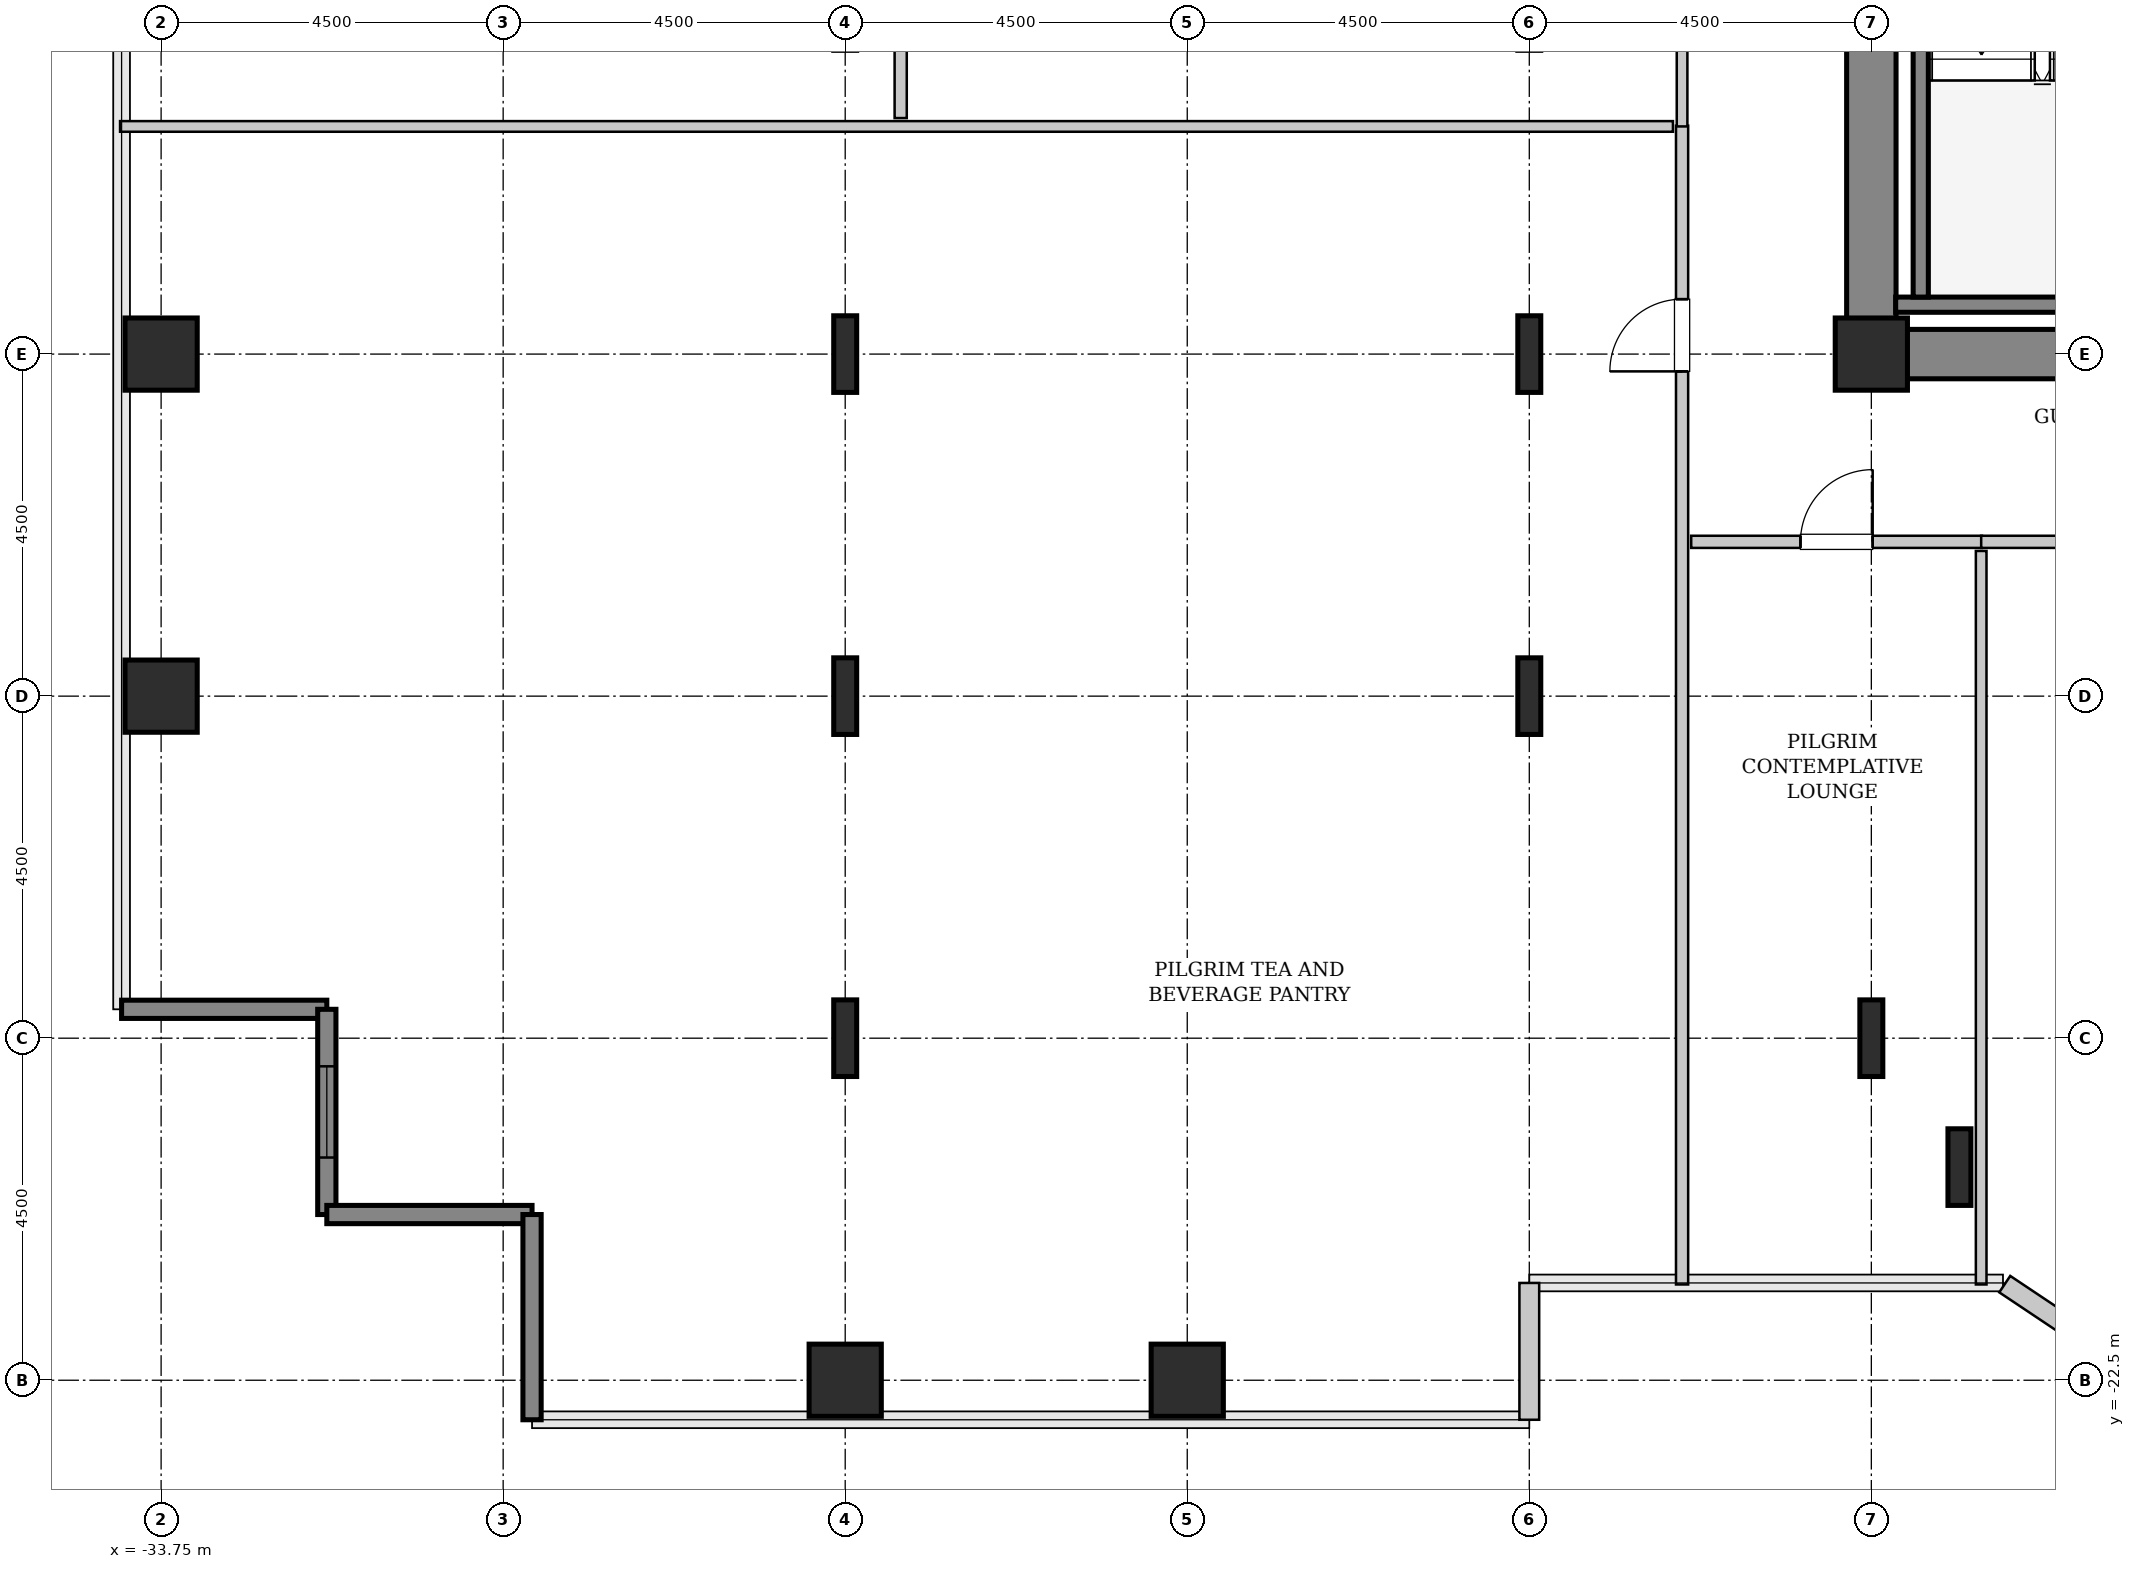
"""IFC4 building model, lengths in metres.
Left out: names, types, materials, properties, quantities, classifications, styles, units other than length and angle.
Written with IfcOpenShell. Run it as: python <this file> out.ifc"""

import sys

from ifc_helpers import new_model, si_unit, direction, frame, frame_2d, origin, origin_2d, place, context, subcontext, project, spatial, rectangle, hollow_rectangle, i_section, extrude, source, transform, mapped, element, fill, save


model = new_model("IFC4")
c1 = context("Model", 3, precision=1e-05, world=origin(), true_north=direction((0.0, 1.0)))
c2 = subcontext(c1, "Body", "Model", "MODEL_VIEW")
j1 = project(units=[si_unit("LENGTHUNIT", "METRE"), si_unit("PLANEANGLEUNIT", "RADIAN")], contexts=[c1])
p1 = place(None, origin())
s1 = spatial("IfcSite", under=j1, at=p1, CompositionType="ELEMENT")
p2 = place(p1, origin())
s2 = spatial("IfcBuilding", under=s1, at=p2, CompositionType="ELEMENT")
p3 = place(p2, frame((0.0, 0.0, 59.6)))
s3 = spatial("IfcBuildingStorey", under=s2, at=p3, CompositionType="ELEMENT", Elevation=59.6)
m1 = source(origin(), c2, "Body", "SweptSolid", [
    extrude(rectangle(XDim=10.025, YDim=0.65, at=frame_2d((5.012, 0.0))), origin(), (0.0, 0.0, 1.0), 3.8),
])
p4 = place(p3, frame((-11.575, -9.0, 0.0), z_axis=(0.0, 0.0, 1.0), x_axis=(1.0, 0.0, 0.0)))
e1 = element("IfcWall", 1, at=p4, inside=s3, PredefinedType="SHEAR", context=c2, shape_type="MappedRepresentation", body=[
    mapped(m1, transform((0.0, 0.0, 0.0), x_axis=(1.0, 0.0, 0.0), y_axis=(0.0, 1.0, 0.0), z_axis=(0.0, 0.0, 1.0), scale=1.0)),
])
m2 = source(origin(), c2, "Body", "SweptSolid", [
    extrude(rectangle(XDim=7.325, YDim=0.65, at=frame_2d((3.663, 0.0))), origin(), (0.0, 0.0, 1.0), 3.8),
])
p5 = place(p3, frame((-11.25, -8.675, 0.0), z_axis=(0.0, 0.0, 1.0), x_axis=(0.0, 1.0, 0.0)))
e2 = element("IfcWall", 2, at=p5, inside=s3, PredefinedType="SHEAR", context=c2, shape_type="MappedRepresentation", body=[
    mapped(m2, transform((0.0, 0.0, 0.0), x_axis=(1.0, 0.0, 0.0), y_axis=(0.0, 1.0, 0.0), z_axis=(0.0, 0.0, 1.0), scale=1.0)),
])
m3 = source(origin(), c2, "Body", "SweptSolid", [
    extrude(hollow_rectangle(XDim=0.95, YDim=0.95, WallThickness=0.045, InnerFilletRadius=0.045, OuterFilletRadius=0.09, at=origin_2d()), origin(), (0.0, 0.0, 1.0), 3.8),
])
for number, where, z_axis, x_axis in (
    (3, (-33.75, -13.5, 0.0), (0.0, 0.0, 1.0), (1.0, 0.0, 0.0)),
    (4, (-33.75, -9.0, 0.0), (0.0, 0.0, 1.0), (1.0, 0.0, 0.0)),
    (5, (-24.75, -22.5, 0.0), (0.0, 0.0, 1.0), (1.0, 0.0, 0.0)),
):
    element("IfcColumn", number, at=place(p3, frame(where, z_axis=z_axis, x_axis=x_axis)), inside=s3, PredefinedType="COLUMN", context=c2, shape_type="MappedRepresentation", body=[
        mapped(m3, transform((0.0, 0.0, 0.0), x_axis=(1.0, 0.0, 0.0), y_axis=(0.0, 1.0, 0.0), z_axis=(0.0, 0.0, 1.0), scale=1.0)),
    ])
m4 = source(origin(), c2, "Body", "SweptSolid", [
    extrude(i_section(OverallWidth=0.302, OverallDepth=1.008, WebThickness=0.021, FlangeThickness=0.04, FilletRadius=0.03, at=origin_2d()), origin(), (0.0, 0.0, 1.0), 3.8),
])
for number, where, z_axis, x_axis in (
    (6, (-24.75, -18.0, 0.0), (0.0, 0.0, 1.0), (1.0, 0.0, 0.0)),
    (7, (-24.75, -13.5, 0.0), (0.0, 0.0, 1.0), (1.0, 0.0, 0.0)),
    (8, (-24.75, -9.0, 0.0), (0.0, 0.0, 1.0), (1.0, 0.0, 0.0)),
):
    element("IfcColumn", number, at=place(p3, frame(where, z_axis=z_axis, x_axis=x_axis)), inside=s3, PredefinedType="COLUMN", context=c2, shape_type="MappedRepresentation", body=[
        mapped(m4, transform((0.0, 0.0, 0.0), x_axis=(1.0, 0.0, 0.0), y_axis=(0.0, 1.0, 0.0), z_axis=(0.0, 0.0, 1.0), scale=1.0)),
    ])
p6 = place(p3, frame((-20.25, -22.5, 0.0), z_axis=(0.0, 0.0, 1.0), x_axis=(1.0, 0.0, 0.0)))
e9 = element("IfcColumn", 9, at=p6, inside=s3, PredefinedType="COLUMN", context=c2, shape_type="MappedRepresentation", body=[
    mapped(m3, transform((0.0, 0.0, 0.0), x_axis=(1.0, 0.0, 0.0), y_axis=(0.0, 1.0, 0.0), z_axis=(0.0, 0.0, 1.0), scale=1.0)),
])
for number, where, z_axis, x_axis in (
    (10, (-15.75, -13.5, 0.0), (0.0, 0.0, 1.0), (1.0, 0.0, 0.0)),
    (11, (-15.75, -9.0, 0.0), (0.0, 0.0, 1.0), (1.0, 0.0, 0.0)),
    (12, (-11.25, -18.0, 0.0), (0.0, 0.0, 1.0), (1.0, 0.0, 0.0)),
):
    element("IfcColumn", number, at=place(p3, frame(where, z_axis=z_axis, x_axis=x_axis)), inside=s3, PredefinedType="COLUMN", context=c2, shape_type="MappedRepresentation", body=[
        mapped(m4, transform((0.0, 0.0, 0.0), x_axis=(1.0, 0.0, 0.0), y_axis=(0.0, 1.0, 0.0), z_axis=(0.0, 0.0, 1.0), scale=1.0)),
    ])
m5 = source(origin(), c2, "Body", "SweptSolid", [
    extrude(hollow_rectangle(XDim=0.95, YDim=0.95, WallThickness=0.045, InnerFilletRadius=0.045, OuterFilletRadius=0.09, at=origin_2d()), origin(), (0.0, 0.0, 1.0), 3.8),
])
p7 = place(p3, frame((-11.25, -9.0, 0.0), z_axis=(0.0, 0.0, 1.0), x_axis=(1.0, 0.0, 0.0)))
e13 = element("IfcColumn", 13, at=p7, inside=s3, PredefinedType="COLUMN", context=c2, shape_type="MappedRepresentation", body=[
    mapped(m5, transform((0.0, 0.0, 0.0), x_axis=(1.0, 0.0, 0.0), y_axis=(0.0, 1.0, 0.0), z_axis=(0.0, 0.0, 1.0), scale=1.0)),
])
p8 = place(p3, frame((-10.091, -19.696, 0.0), z_axis=(0.0, 0.0, 1.0), x_axis=(1.0, 0.0, 0.0)))
e14 = element("IfcColumn", 14, at=p8, inside=s3, PredefinedType="COLUMN", context=c2, shape_type="MappedRepresentation", body=[
    mapped(m4, transform((0.0, 0.0, 0.0), x_axis=(1.0, 0.0, 0.0), y_axis=(0.0, 1.0, 0.0), z_axis=(0.0, 0.0, 1.0), scale=1.0)),
])
m6 = source(origin(), c2, "Body", "SweptSolid", [
    extrude(rectangle(XDim=2.7, YDim=0.24, at=frame_2d((1.35, 0.0))), origin(), (0.0, 0.0, 1.0), 3.55),
])
p9 = place(p3, frame((-34.27, -17.62, 0.0), z_axis=(0.0, 0.0, 1.0), x_axis=(1.0, 0.0, 0.0)))
e15 = element("IfcWall", 15, at=p9, inside=s3, PredefinedType="SHEAR", context=c2, shape_type="MappedRepresentation", body=[
    mapped(m6, transform((0.0, 0.0, 0.0), x_axis=(1.0, 0.0, 0.0), y_axis=(0.0, 1.0, 0.0), z_axis=(0.0, 0.0, 1.0), scale=1.0)),
])
p10 = place(p3, frame((-31.57, -17.62, 0.0), z_axis=(0.0, 0.0, 1.0), x_axis=(0.0, -1.0, 0.0)))
e16 = element("IfcWall", 16, at=p10, inside=s3, PredefinedType="SHEAR", context=c2, shape_type="MappedRepresentation", body=[
    mapped(m6, transform((0.0, 0.0, 0.0), x_axis=(1.0, 0.0, 0.0), y_axis=(0.0, 1.0, 0.0), z_axis=(0.0, 0.0, 1.0), scale=1.0)),
])
p11 = place(p10, frame((0.75, 0.0, 0.85)))
e17 = element("IfcOpeningElement", 17, at=p11, cuts=e16, PredefinedType="OPENING", context=c2, shape_type="SweptSolid", body=[
    extrude(rectangle(XDim=1.2, YDim=1.8, at=frame_2d((0.6, 0.9))), frame((0.0, 0.13, 0.0), z_axis=(0.0, -1.0, 0.0), x_axis=(1.0, 0.0, 0.0)), (0.0, 0.0, 1.0), 0.26),
])
for number, where, z_axis, x_axis in (
    (18, (-31.57, -20.32, 0.0), (0.0, 0.0, 1.0), (1.0, 0.0, 0.0)),
    (19, (-28.87, -20.32, 0.0), (0.0, 0.0, 1.0), (0.0, -1.0, 0.0)),
):
    element("IfcWall", number, at=place(p3, frame(where, z_axis=z_axis, x_axis=x_axis)), inside=s3, PredefinedType="SHEAR", context=c2, shape_type="MappedRepresentation", body=[
        mapped(m6, transform((0.0, 0.0, 0.0), x_axis=(1.0, 0.0, 0.0), y_axis=(0.0, 1.0, 0.0), z_axis=(0.0, 0.0, 1.0), scale=1.0)),
    ])
m7 = source(origin(), c2, "Body", "SweptSolid", [
    extrude(rectangle(XDim=1.8, YDim=0.26, at=frame_2d((0.9, 0.0))), origin(), (0.0, 0.0, 1.0), 3.55),
])
p12 = place(p3, frame((-15.75, -23.02, 0.0), z_axis=(0.0, 0.0, 1.0), x_axis=(0.0, 1.0, 0.0)))
e20 = element("IfcWall", 20, at=p12, inside=s3, PredefinedType="SOLIDWALL", context=c2, shape_type="MappedRepresentation", body=[
    mapped(m7, transform((0.0, 0.0, 0.0), x_axis=(1.0, 0.0, 0.0), y_axis=(0.0, 1.0, 0.0), z_axis=(0.0, 0.0, 1.0), scale=1.0)),
])
m8 = source(origin(), c2, "Body", "SweptSolid", [
    extrude(rectangle(XDim=1.469, YDim=0.26, at=frame_2d((0.734, 0.0))), origin(), (0.0, 0.0, 1.0), 3.55),
])
p13 = place(p3, frame((-9.495, -21.236, 0.0), z_axis=(0.0, 0.0, 1.0), x_axis=(0.831461760506, -0.555581983884, 0.0)))
e21 = element("IfcWall", 21, at=p13, inside=s3, PredefinedType="SOLIDWALL", context=c2, shape_type="MappedRepresentation", body=[
    mapped(m8, transform((0.0, 0.0, 0.0), x_axis=(1.0, 0.0, 0.0), y_axis=(0.0, 1.0, 0.0), z_axis=(0.0, 0.0, 1.0), scale=1.0)),
])
m9 = source(origin(), c2, "Body", "SweptSolid", [
    extrude(rectangle(XDim=3.63, YDim=0.2, at=frame_2d((1.815, 0.0))), origin(), (0.0, 0.0, 1.0), 3.8),
])
p14 = place(p3, frame((-10.93, -8.35, 0.0), z_axis=(0.0, 0.0, 1.0), x_axis=(1.0, 0.0, 0.0)))
e22 = element("IfcWall", 22, at=p14, inside=s3, PredefinedType="SOLIDWALL", context=c2, shape_type="MappedRepresentation", body=[
    mapped(m9, transform((0.0, 0.0, 0.0), x_axis=(1.0, 0.0, 0.0), y_axis=(0.0, 1.0, 0.0), z_axis=(0.0, 0.0, 1.0), scale=1.0)),
])
m10 = source(origin(), c2, "Body", "SweptSolid", [
    extrude(rectangle(XDim=7.1, YDim=0.2, at=frame_2d((3.55, 0.0))), origin(), (0.0, 0.0, 1.0), 3.8),
])
p15 = place(p3, frame((-10.6, -1.15, 0.0), z_axis=(0.0, 0.0, 1.0), x_axis=(0.0, -1.0, 0.0)))
e23 = element("IfcWall", 23, at=p15, inside=s3, PredefinedType="SOLIDWALL", context=c2, shape_type="MappedRepresentation", body=[
    mapped(m10, transform((0.0, 0.0, 0.0), x_axis=(1.0, 0.0, 0.0), y_axis=(0.0, 1.0, 0.0), z_axis=(0.0, 0.0, 1.0), scale=1.0)),
])
m11 = source(origin(), c2, "Body", "SweptSolid", [
    extrude(rectangle(XDim=15.245, YDim=0.16, at=frame_2d((7.623, 0.0))), origin(), (0.0, 0.0, 1.0), 3.535),
])
p16 = place(p3, frame((-13.74, -21.24, 0.0), z_axis=(0.0, 0.0, 1.0), x_axis=(0.0, 1.0, 0.0)))
e24 = element("IfcWall", 24, at=p16, inside=s3, PredefinedType="PARTITIONING", context=c2, shape_type="MappedRepresentation", body=[
    mapped(m11, transform((0.0, 0.0, 0.0), x_axis=(1.0, 0.0, 0.0), y_axis=(0.0, 1.0, 0.0), z_axis=(0.0, 0.0, 1.0), scale=1.0)),
])
p17 = place(p16, frame((12.012, 0.0, 0.0)))
e25 = element("IfcOpeningElement", 25, at=p17, cuts=e24, PredefinedType="OPENING", context=c2, shape_type="SweptSolid", body=[
    extrude(rectangle(XDim=0.95, YDim=2.1, at=frame_2d((0.475, 1.05))), frame((0.0, 0.09, 0.0), z_axis=(0.0, -1.0, 0.0), x_axis=(1.0, 0.0, 0.0)), (0.0, 0.0, 1.0), 0.18),
])
m12 = source(origin(), c2, "Body", "SweptSolid", [
    extrude(rectangle(XDim=20.43, YDim=0.14, at=frame_2d((10.215, 0.0))), origin(), (0.0, 0.0, 1.0), 3.535),
])
p18 = place(p3, frame((-34.29, -6.005, 0.0), z_axis=(0.0, 0.0, 1.0), x_axis=(1.0, 0.0, 0.0)))
e26 = element("IfcWall", 26, at=p18, inside=s3, PredefinedType="PARTITIONING", context=c2, shape_type="MappedRepresentation", body=[
    mapped(m12, transform((0.0, 0.0, 0.0), x_axis=(1.0, 0.0, 0.0), y_axis=(0.0, 1.0, 0.0), z_axis=(0.0, 0.0, 1.0), scale=1.0)),
])
m13 = source(origin(), c2, "Body", "SweptSolid", [
    extrude(rectangle(XDim=7.265, YDim=0.14, at=frame_2d((3.632, 0.0))), origin(), (0.0, 0.0, 1.0), 3.535),
])
p19 = place(p3, frame((-13.74, -6.005, 0.0), z_axis=(0.0, 0.0, 1.0), x_axis=(0.0, 1.0, 0.0)))
e27 = element("IfcWall", 27, at=p19, inside=s3, PredefinedType="PARTITIONING", context=c2, shape_type="MappedRepresentation", body=[
    mapped(m13, transform((0.0, 0.0, 0.0), x_axis=(1.0, 0.0, 0.0), y_axis=(0.0, 1.0, 0.0), z_axis=(0.0, 0.0, 1.0), scale=1.0)),
])
m14 = source(origin(), c2, "Body", "SweptSolid", [
    extrude(rectangle(XDim=14.282, YDim=0.16, at=frame_2d((7.141, 0.0))), origin(), (0.0, 0.0, 1.0), 3.535),
])
p20 = place(p3, frame((-24.02, -5.895, 0.0), z_axis=(0.0, 0.0, 1.0), x_axis=(0.0, 1.0, 0.0)))
e28 = element("IfcWall", 28, at=p20, inside=s3, PredefinedType="PARTITIONING", context=c2, shape_type="MappedRepresentation", body=[
    mapped(m14, transform((0.0, 0.0, 0.0), x_axis=(1.0, 0.0, 0.0), y_axis=(0.0, 1.0, 0.0), z_axis=(0.0, 0.0, 1.0), scale=1.0)),
])
p21 = place(p20, frame((7.67, 0.0, 0.0)))
e29 = element("IfcOpeningElement", 29, at=p21, cuts=e28, PredefinedType="OPENING", context=c2, shape_type="SweptSolid", body=[
    extrude(rectangle(XDim=0.95, YDim=2.1, at=frame_2d((0.475, 1.05))), frame((0.0, 0.09, 0.0), z_axis=(0.0, -1.0, 0.0), x_axis=(1.0, 0.0, 0.0)), (0.0, 0.0, 1.0), 0.18),
])
m15 = source(origin(), c2, "Body", "SweptSolid", [
    extrude(rectangle(XDim=3.825, YDim=0.16, at=frame_2d((1.913, 0.0))), origin(), (0.0, 0.0, 1.0), 3.535),
])
p22 = place(p3, frame((-13.62, -11.47, 0.0), z_axis=(0.0, 0.0, 1.0), x_axis=(1.0, 0.0, 0.0)))
e30 = element("IfcWall", 30, at=p22, inside=s3, PredefinedType="PARTITIONING", context=c2, shape_type="MappedRepresentation", body=[
    mapped(m15, transform((0.0, 0.0, 0.0), x_axis=(1.0, 0.0, 0.0), y_axis=(0.0, 1.0, 0.0), z_axis=(0.0, 0.0, 1.0), scale=1.0)),
])
p23 = place(p22, frame((1.438, 0.0, 0.0)))
e31 = element("IfcOpeningElement", 31, at=p23, cuts=e30, PredefinedType="OPENING", context=c2, shape_type="SweptSolid", body=[
    extrude(rectangle(XDim=0.95, YDim=2.1, at=frame_2d((0.475, 1.05))), frame((0.0, 0.09, 0.0), z_axis=(0.0, -1.0, 0.0), x_axis=(1.0, 0.0, 0.0)), (0.0, 0.0, 1.0), 0.18),
])
m16 = source(origin(), c2, "Body", "SweptSolid", [
    extrude(rectangle(XDim=9.65, YDim=0.14, at=frame_2d((4.825, 0.0))), origin(), (0.0, 0.0, 1.0), 3.535),
])
p24 = place(p3, frame((-9.805, -21.24, 0.0), z_axis=(0.0, 0.0, 1.0), x_axis=(0.0, 1.0, 0.0)))
e32 = element("IfcWall", 32, at=p24, inside=s3, PredefinedType="PARTITIONING", context=c2, shape_type="MappedRepresentation", body=[
    mapped(m16, transform((0.0, 0.0, 0.0), x_axis=(1.0, 0.0, 0.0), y_axis=(0.0, 1.0, 0.0), z_axis=(0.0, 0.0, 1.0), scale=1.0)),
])
m17 = source(origin(), c2, "Body", "SweptSolid", [
    extrude(rectangle(XDim=4.61, YDim=0.16, at=frame_2d((2.305, 0.0))), origin(), (0.0, 0.0, 1.0), 3.535),
])
p25 = place(p3, frame((-9.805, -11.47, 0.0), z_axis=(0.0, 0.0, 1.0), x_axis=(1.0, 0.0, 0.0)))
e33 = element("IfcWall", 33, at=p25, inside=s3, PredefinedType="PARTITIONING", context=c2, shape_type="MappedRepresentation", body=[
    mapped(m17, transform((0.0, 0.0, 0.0), x_axis=(1.0, 0.0, 0.0), y_axis=(0.0, 1.0, 0.0), z_axis=(0.0, 0.0, 1.0), scale=1.0)),
])
p26 = place(p25, frame((1.83, 0.0, 0.0)))
e34 = element("IfcOpeningElement", 34, at=p26, cuts=e33, PredefinedType="OPENING", context=c2, shape_type="SweptSolid", body=[
    extrude(rectangle(XDim=0.95, YDim=2.1, at=frame_2d((0.475, 1.05))), frame((0.0, 0.09, 0.0), z_axis=(0.0, -1.0, 0.0), x_axis=(1.0, 0.0, 0.0)), (0.0, 0.0, 1.0), 0.18),
])
m18 = source(origin(), c2, "Body", "SweptSolid", [
    extrude(rectangle(XDim=1.2, YDim=1.8, at=frame_2d((0.6, 0.9))), frame((0.0, 0.03, 0.0), z_axis=(0.0, -1.0, 0.0), x_axis=(1.0, 0.0, 0.0)), (0.0, 0.0, 1.0), 0.06),
])
p27 = place(p11, origin())
e35 = element("IfcWindow", 35, at=p27, inside=s3, PartitioningType="SINGLE_PANEL", PredefinedType="WINDOW", context=c2, shape_type="MappedRepresentation", body=[
    mapped(m18, transform((0.0, 0.0, 0.0), x_axis=(1.0, 0.0, 0.0), y_axis=(0.0, 1.0, 0.0), z_axis=(0.0, 0.0, 1.0), scale=1.0)),
])
fill(e17, e35)
m19 = source(origin(), c2, "Body", "SweptSolid", [
    extrude(rectangle(XDim=0.95, YDim=2.1, at=frame_2d((0.475, 1.05))), frame((0.0, 0.025, 0.0), z_axis=(0.0, -1.0, 0.0), x_axis=(1.0, 0.0, 0.0)), (0.0, 0.0, 1.0), 0.05),
])
p28 = place(p17, origin())
e36 = element("IfcDoor", 36, at=p28, inside=s3, OperationType="SINGLE_SWING_LEFT", PredefinedType="DOOR", context=c2, shape_type="MappedRepresentation", body=[
    mapped(m19, transform((0.0, 0.0, 0.0), x_axis=(1.0, 0.0, 0.0), y_axis=(0.0, 1.0, 0.0), z_axis=(0.0, 0.0, 1.0), scale=1.0)),
])
fill(e25, e36)
p29 = place(p23, origin())
e37 = element("IfcDoor", 37, at=p29, inside=s3, OperationType="SINGLE_SWING_RIGHT", PredefinedType="DOOR", context=c2, shape_type="MappedRepresentation", body=[
    mapped(m19, transform((0.0, 0.0, 0.0), x_axis=(1.0, 0.0, 0.0), y_axis=(0.0, 1.0, 0.0), z_axis=(0.0, 0.0, 1.0), scale=1.0)),
])
fill(e31, e37)
save(model, sys.argv[1])
